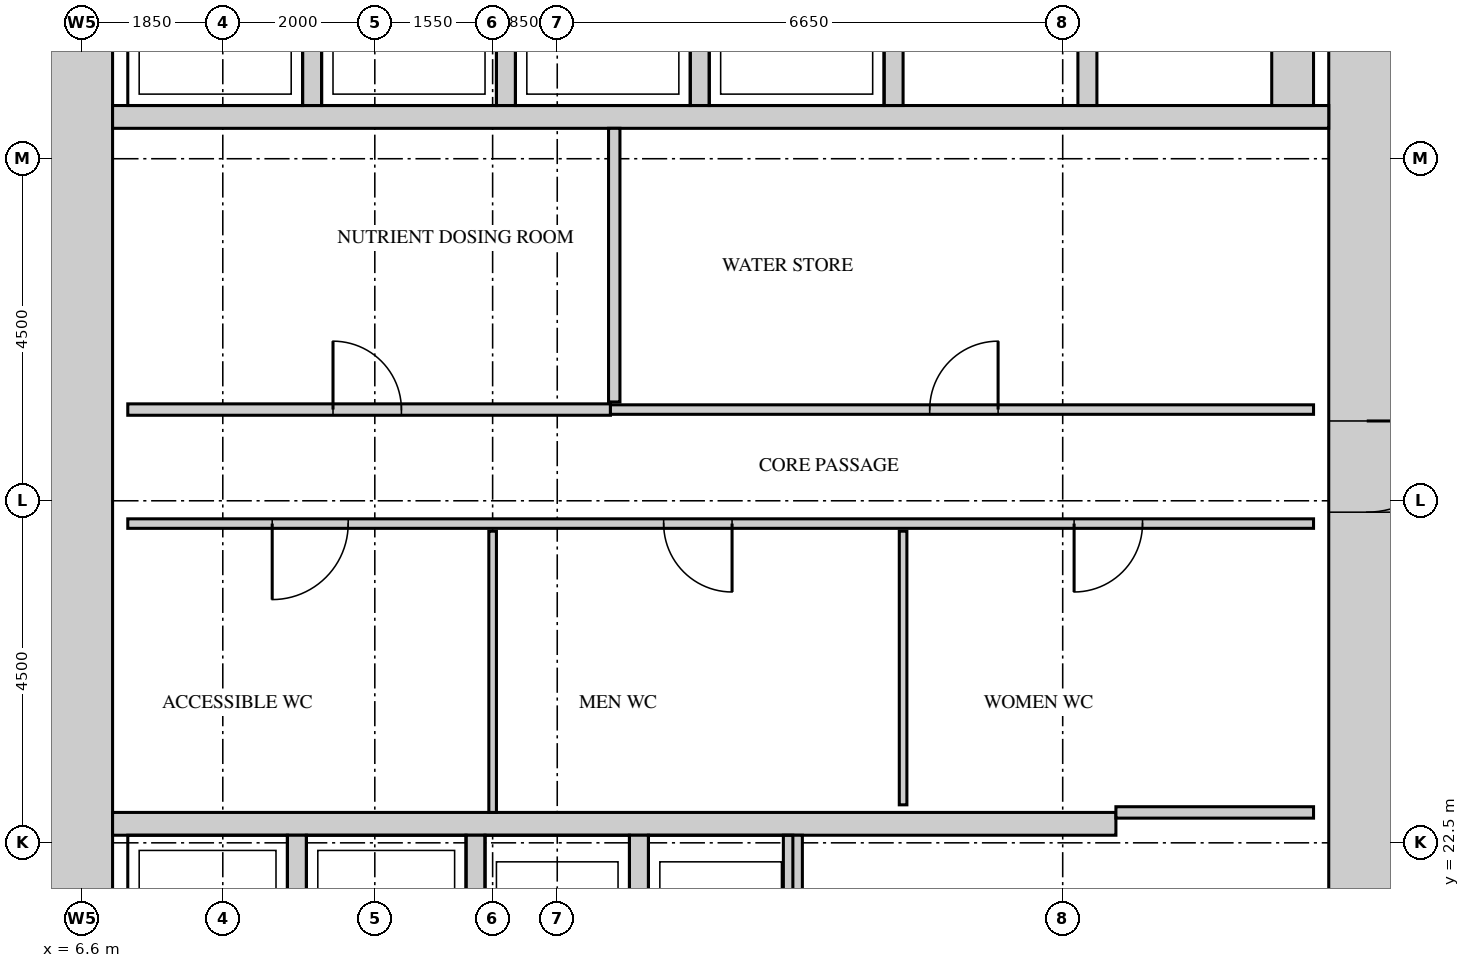
"""IFC4 building model, lengths in metres.
Left out: names, types, materials, properties, quantities, classifications, styles, units other than length and angle.
Written with IfcOpenShell. Run it as: python <this file> out.ifc"""

import sys

from ifc_helpers import new_model, si_unit, direction, frame, frame_2d, origin, place, context, subcontext, project, spatial, rectangle, extrude, source, transform, mapped, element, fill, save


model = new_model("IFC4")
c1 = context("Model", 3, precision=1e-05, world=origin(), true_north=direction((0.0, 1.0)))
c2 = subcontext(c1, "Body", "Model", "MODEL_VIEW")
j1 = project(units=[si_unit("LENGTHUNIT", "METRE"), si_unit("PLANEANGLEUNIT", "RADIAN")], contexts=[c1])
p1 = place(None, origin())
s1 = spatial("IfcSite", under=j1, at=p1, CompositionType="ELEMENT")
p2 = place(p1, origin())
s2 = spatial("IfcBuilding", under=s1, at=p2, CompositionType="ELEMENT")
p3 = place(p2, frame((0.0, 0.0, 101.5)))
s3 = spatial("IfcBuildingStorey", under=s2, at=p3, CompositionType="ELEMENT", Elevation=101.5)
m1 = source(origin(), c2, "Body", "SweptSolid", [
    extrude(rectangle(XDim=28.0, YDim=1.0, at=frame_2d((14.0, 0.0))), origin(), (0.0, 0.0, 1.0), 4.1),
])
p4 = place(p3, frame((23.5, 13.0, 0.0), z_axis=(0.0, 0.0, 1.0), x_axis=(0.0, 1.0, 0.0)))
e1 = element("IfcWall", 1, at=p4, inside=s3, PredefinedType="SHEAR", context=c2, shape_type="MappedRepresentation", body=[
    mapped(m1, transform((0.0, 0.0, 0.0))),
])
m2 = source(origin(), c2, "Body", "SweptSolid", [
    extrude(rectangle(XDim=1.8, YDim=2.1, at=frame_2d((0.9, 1.05))), frame((0.0, 0.51, 0.0), z_axis=(0.0, -1.0, 0.0), x_axis=(1.0, 0.0, 0.0)), (0.0, 0.0, 1.0), 1.02),
])
p5 = place(p4, frame((22.6, 0.0, 0.0)))
e2 = element("IfcOpeningElement", 2, at=p5, cuts=e1, PredefinedType="OPENING", context=c2, shape_type="MappedRepresentation", body=[
    mapped(m2, transform((0.0, 0.0, 0.0))),
])
m3 = source(origin(), c2, "Body", "SweptSolid", [
    extrude(rectangle(XDim=1.2, YDim=2.1, at=frame_2d((0.6, 1.05))), frame((0.0, 0.51, 0.0), z_axis=(0.0, -1.0, 0.0), x_axis=(1.0, 0.0, 0.0)), (0.0, 0.0, 1.0), 1.02),
])
p6 = place(p4, frame((13.85, 0.0, 0.0)))
e3 = element("IfcOpeningElement", 3, at=p6, cuts=e1, PredefinedType="OPENING", context=c2, shape_type="MappedRepresentation", body=[
    mapped(m3, transform((0.0, 0.0, 0.0))),
])
m4 = source(origin(), c2, "Body", "SweptSolid", [
    extrude(rectangle(XDim=0.9, YDim=2.1, at=frame_2d((0.45, 1.05))), frame((0.0, 0.51, 0.0), z_axis=(0.0, -1.0, 0.0), x_axis=(1.0, 0.0, 0.0)), (0.0, 0.0, 1.0), 1.02),
])
p7 = place(p4, frame((1.0, 0.0, 0.0)))
e4 = element("IfcOpeningElement", 4, at=p7, cuts=e1, PredefinedType="OPENING", context=c2, shape_type="MappedRepresentation", body=[
    mapped(m4, transform((0.0, 0.0, 0.0))),
])
p8 = place(p4, frame((4.0, 0.0, 0.0)))
e5 = element("IfcOpeningElement", 5, at=p8, cuts=e1, PredefinedType="OPENING", context=c2, shape_type="MappedRepresentation", body=[
    mapped(m4, transform((0.0, 0.0, 0.0))),
])
p9 = place(p4, frame((7.6, 0.0, 0.0)))
e6 = element("IfcOpeningElement", 6, at=p9, cuts=e1, PredefinedType="OPENING", context=c2, shape_type="MappedRepresentation", body=[
    mapped(m4, transform((0.0, 0.0, 0.0))),
])
p10 = place(p3, frame((6.5, 13.0, 0.0), z_axis=(0.0, 0.0, 1.0), x_axis=(0.0, 1.0, 0.0)))
e7 = element("IfcWall", 7, at=p10, inside=s3, PredefinedType="SHEAR", context=c2, shape_type="MappedRepresentation", body=[
    mapped(m1, transform((0.0, 0.0, 0.0))),
])
m5 = source(origin(), c2, "Body", "SweptSolid", [
    extrude(rectangle(XDim=13.2, YDim=0.3, at=frame_2d((6.6, 0.0))), origin(), (0.0, 0.0, 1.0), 4.1),
])
p11 = place(p3, frame((7.0, 22.75, 0.0), z_axis=(0.0, 0.0, 1.0), x_axis=(1.0, 0.0, 0.0)))
e8 = element("IfcWall", 8, at=p11, inside=s3, PredefinedType="STANDARD", context=c2, shape_type="MappedRepresentation", body=[
    mapped(m5, transform((0.0, 0.0, 0.0))),
])
m6 = source(origin(), c2, "Body", "SweptSolid", [
    extrude(rectangle(XDim=16.0, YDim=0.3, at=frame_2d((8.0, 0.0))), origin(), (0.0, 0.0, 1.0), 4.1),
])
p12 = place(p3, frame((7.0, 32.05, 0.0), z_axis=(0.0, 0.0, 1.0), x_axis=(1.0, 0.0, 0.0)))
e9 = element("IfcWall", 9, at=p12, inside=s3, PredefinedType="STANDARD", context=c2, shape_type="MappedRepresentation", body=[
    mapped(m6, transform((0.0, 0.0, 0.0))),
])
m7 = source(origin(), c2, "Body", "SweptSolid", [
    extrude(rectangle(XDim=3.1, YDim=0.25, at=frame_2d((1.55, 0.0))), origin(), (0.0, 0.0, 1.0), 4.1),
])
for number, where, z_axis, x_axis in (
    (10, (9.425, 19.5, 0.0), (0.0, 0.0, 1.0), (0.0, 1.0, 0.0)),
    (11, (11.775, 19.5, 0.0), (0.0, 0.0, 1.0), (0.0, 1.0, 0.0)),
    (12, (13.925, 19.5, 0.0), (0.0, 0.0, 1.0), (0.0, 1.0, 0.0)),
    (13, (15.95, 19.5, 0.0), (0.0, 0.0, 1.0), (0.0, 1.0, 0.0)),
):
    element("IfcWall", number, at=place(p3, frame(where, z_axis=z_axis, x_axis=x_axis)), inside=s3, PredefinedType="STANDARD", context=c2, shape_type="MappedRepresentation", body=[
        mapped(m7, transform((0.0, 0.0, 0.0))),
    ])
m8 = source(origin(), c2, "Body", "SweptSolid", [
    extrude(rectangle(XDim=2.4, YDim=0.25, at=frame_2d((1.2, 0.0))), origin(), (0.0, 0.0, 1.0), 4.1),
])
for number, where, z_axis, x_axis in (
    (14, (9.625, 32.2, 0.0), (0.0, 0.0, 1.0), (0.0, 1.0, 0.0)),
    (15, (12.175, 32.2, 0.0), (0.0, 0.0, 1.0), (0.0, 1.0, 0.0)),
    (16, (14.725, 32.2, 0.0), (0.0, 0.0, 1.0), (0.0, 1.0, 0.0)),
    (17, (17.275, 32.2, 0.0), (0.0, 0.0, 1.0), (0.0, 1.0, 0.0)),
    (18, (19.825, 32.2, 0.0), (0.0, 0.0, 1.0), (0.0, 1.0, 0.0)),
):
    element("IfcWall", number, at=place(p3, frame(where, z_axis=z_axis, x_axis=x_axis)), inside=s3, PredefinedType="STANDARD", context=c2, shape_type="MappedRepresentation", body=[
        mapped(m8, transform((0.0, 0.0, 0.0))),
    ])
m9 = source(origin(), c2, "Body", "SweptSolid", [
    extrude(rectangle(XDim=2.4, YDim=0.55, at=frame_2d((1.2, 0.0))), origin(), (0.0, 0.0, 1.0), 4.1),
])
p13 = place(p3, frame((22.525, 32.2, 0.0), z_axis=(0.0, 0.0, 1.0), x_axis=(0.0, 1.0, 0.0)))
e19 = element("IfcWall", 19, at=p13, inside=s3, PredefinedType="STANDARD", context=c2, shape_type="MappedRepresentation", body=[
    mapped(m9, transform((0.0, 0.0, 0.0))),
])
m10 = source(origin(), c2, "Body", "SweptSolid", [
    extrude(rectangle(XDim=3.7, YDim=0.1, at=frame_2d((1.85, 0.0))), origin(), (0.0, 0.0, 1.0), 4.2),
])
p14 = place(p3, frame((12.0, 22.9, 0.0), z_axis=(0.0, 0.0, 1.0), x_axis=(0.0, 1.0, 0.0)))
e20 = element("IfcWall", 20, at=p14, inside=s3, PredefinedType="PARTITIONING", context=c2, shape_type="MappedRepresentation", body=[
    mapped(m10, transform((0.0, 0.0, 0.0))),
])
m11 = source(origin(), c2, "Body", "SweptSolid", [
    extrude(rectangle(XDim=2.6, YDim=0.15, at=frame_2d((1.3, 0.0))), origin(), (0.0, 0.0, 1.0), 4.2),
])
p15 = place(p3, frame((20.2, 22.9, 0.0), z_axis=(0.0, 0.0, 1.0), x_axis=(1.0, 0.0, 0.0)))
e21 = element("IfcWall", 21, at=p15, inside=s3, PredefinedType="PARTITIONING", context=c2, shape_type="MappedRepresentation", body=[
    mapped(m11, transform((0.0, 0.0, 0.0))),
])
m12 = source(origin(), c2, "Body", "SweptSolid", [
    extrude(rectangle(XDim=3.6, YDim=0.1, at=frame_2d((1.8, 0.0))), origin(), (0.0, 0.0, 1.0), 4.2),
])
p16 = place(p3, frame((17.4, 23.0, 0.0), z_axis=(0.0, 0.0, 1.0), x_axis=(0.0, 1.0, 0.0)))
e22 = element("IfcWall", 22, at=p16, inside=s3, PredefinedType="PARTITIONING", context=c2, shape_type="MappedRepresentation", body=[
    mapped(m12, transform((0.0, 0.0, 0.0))),
])
m13 = source(origin(), c2, "Body", "SweptSolid", [
    extrude(rectangle(XDim=15.6, YDim=0.125, at=frame_2d((7.8, 0.0))), origin(), (0.0, 0.0, 1.0), 4.2),
])
p17 = place(p3, frame((7.2, 26.7, 0.0), z_axis=(0.0, 0.0, 1.0), x_axis=(1.0, 0.0, 0.0)))
e23 = element("IfcWall", 23, at=p17, inside=s3, PredefinedType="PARTITIONING", context=c2, shape_type="MappedRepresentation", body=[
    mapped(m13, transform((0.0, 0.0, 0.0))),
])
m14 = source(origin(), c2, "Body", "SweptSolid", [
    extrude(rectangle(XDim=1.0, YDim=2.1, at=frame_2d((0.5, 1.05))), frame((0.0, 0.073, 0.0), z_axis=(0.0, -1.0, 0.0), x_axis=(1.0, 0.0, 0.0)), (0.0, 0.0, 1.0), 0.145),
])
p18 = place(p17, frame((1.9, 0.0, 0.0)))
e24 = element("IfcOpeningElement", 24, at=p18, cuts=e23, PredefinedType="OPENING", context=c2, shape_type="MappedRepresentation", body=[
    mapped(m14, transform((0.0, 0.0, 0.0))),
])
m15 = source(origin(), c2, "Body", "SweptSolid", [
    extrude(rectangle(XDim=0.9, YDim=2.1, at=frame_2d((0.45, 1.05))), frame((0.0, 0.073, 0.0), z_axis=(0.0, -1.0, 0.0), x_axis=(1.0, 0.0, 0.0)), (0.0, 0.0, 1.0), 0.145),
])
p19 = place(p17, frame((7.05, 0.0, 0.0)))
e25 = element("IfcOpeningElement", 25, at=p19, cuts=e23, PredefinedType="OPENING", context=c2, shape_type="MappedRepresentation", body=[
    mapped(m15, transform((0.0, 0.0, 0.0))),
])
p20 = place(p17, frame((12.45, 0.0, 0.0)))
e26 = element("IfcOpeningElement", 26, at=p20, cuts=e23, PredefinedType="OPENING", context=c2, shape_type="MappedRepresentation", body=[
    mapped(m15, transform((0.0, 0.0, 0.0))),
])
m16 = source(origin(), c2, "Body", "SweptSolid", [
    extrude(rectangle(XDim=6.35, YDim=0.15, at=frame_2d((3.175, 0.0))), origin(), (0.0, 0.0, 1.0), 4.2),
])
p21 = place(p3, frame((7.2, 28.2, 0.0), z_axis=(0.0, 0.0, 1.0), x_axis=(1.0, 0.0, 0.0)))
e27 = element("IfcWall", 27, at=p21, inside=s3, PredefinedType="PARTITIONING", context=c2, shape_type="MappedRepresentation", body=[
    mapped(m16, transform((0.0, 0.0, 0.0))),
])
m17 = source(origin(), c2, "Body", "SweptSolid", [
    extrude(rectangle(XDim=0.9, YDim=2.1, at=frame_2d((0.45, 1.05))), frame((0.0, 0.085, 0.0), z_axis=(0.0, -1.0, 0.0), x_axis=(1.0, 0.0, 0.0)), (0.0, 0.0, 1.0), 0.17),
])
p22 = place(p21, frame((2.7, 0.0, 0.0)))
e28 = element("IfcOpeningElement", 28, at=p22, cuts=e27, PredefinedType="OPENING", context=c2, shape_type="MappedRepresentation", body=[
    mapped(m17, transform((0.0, 0.0, 0.0))),
])
m18 = source(origin(), c2, "Body", "SweptSolid", [
    extrude(rectangle(XDim=9.25, YDim=0.125, at=frame_2d((4.625, 0.0))), origin(), (0.0, 0.0, 1.0), 4.2),
])
p23 = place(p3, frame((13.55, 28.2, 0.0), z_axis=(0.0, 0.0, 1.0), x_axis=(1.0, 0.0, 0.0)))
e29 = element("IfcWall", 29, at=p23, inside=s3, PredefinedType="PARTITIONING", context=c2, shape_type="MappedRepresentation", body=[
    mapped(m18, transform((0.0, 0.0, 0.0))),
])
p24 = place(p23, frame((4.2, 0.0, 0.0)))
e30 = element("IfcOpeningElement", 30, at=p24, cuts=e29, PredefinedType="OPENING", context=c2, shape_type="MappedRepresentation", body=[
    mapped(m15, transform((0.0, 0.0, 0.0))),
])
m19 = source(origin(), c2, "Body", "SweptSolid", [
    extrude(rectangle(XDim=3.6, YDim=0.15, at=frame_2d((1.8, 0.0))), origin(), (0.0, 0.0, 1.0), 4.2),
])
p25 = place(p3, frame((13.6, 28.3, 0.0), z_axis=(0.0, 0.0, 1.0), x_axis=(0.0, 1.0, 0.0)))
e31 = element("IfcWall", 31, at=p25, inside=s3, PredefinedType="PARTITIONING", context=c2, shape_type="MappedRepresentation", body=[
    mapped(m19, transform((0.0, 0.0, 0.0))),
])
m20 = source(origin(), c2, "Body", "SweptSolid", [
    extrude(rectangle(XDim=1.2, YDim=2.1, at=frame_2d((0.6, 1.05))), frame((0.0, 0.45, 0.0), z_axis=(0.0, -1.0, 0.0), x_axis=(1.0, 0.0, 0.0)), (0.0, 0.0, 1.0), 0.9),
])
p26 = place(p6, origin())
e32 = element("IfcDoor", 32, at=p26, inside=s3, OperationType="SINGLE_SWING_RIGHT", PredefinedType="DOOR", context=c2, shape_type="MappedRepresentation", body=[
    mapped(m20, transform((0.0, 0.0, 0.0))),
])
fill(e3, e32)
m21 = source(origin(), c2, "Body", "SweptSolid", [
    extrude(rectangle(XDim=0.9, YDim=2.1, at=frame_2d((0.45, 1.05))), frame((0.0, 0.025, 0.0), z_axis=(0.0, -1.0, 0.0), x_axis=(1.0, 0.0, 0.0)), (0.0, 0.0, 1.0), 0.05),
])
p27 = place(p22, origin())
e33 = element("IfcDoor", 33, at=p27, inside=s3, OperationType="SINGLE_SWING_RIGHT", PredefinedType="DOOR", context=c2, shape_type="MappedRepresentation", body=[
    mapped(m21, transform((0.0, 0.0, 0.0))),
])
fill(e28, e33)
p28 = place(p24, origin())
e34 = element("IfcDoor", 34, at=p28, inside=s3, OperationType="SINGLE_SWING_LEFT", PredefinedType="DOOR", context=c2, shape_type="MappedRepresentation", body=[
    mapped(m21, transform((0.0, 0.0, 0.0))),
])
fill(e30, e34)
m22 = source(origin(), c2, "Body", "SweptSolid", [
    extrude(rectangle(XDim=1.0, YDim=2.1, at=frame_2d((0.5, 1.05))), frame((0.0, 0.025, 0.0), z_axis=(0.0, -1.0, 0.0), x_axis=(1.0, 0.0, 0.0)), (0.0, 0.0, 1.0), 0.05),
])
p29 = place(p18, origin())
e35 = element("IfcDoor", 35, at=p29, inside=s3, OperationType="SINGLE_SWING_LEFT", PredefinedType="DOOR", context=c2, shape_type="MappedRepresentation", body=[
    mapped(m22, transform((0.0, 0.0, 0.0))),
])
fill(e24, e35)
p30 = place(p19, origin())
e36 = element("IfcDoor", 36, at=p30, inside=s3, OperationType="SINGLE_SWING_RIGHT", PredefinedType="DOOR", context=c2, shape_type="MappedRepresentation", body=[
    mapped(m21, transform((0.0, 0.0, 0.0))),
])
fill(e25, e36)
p31 = place(p20, origin())
e37 = element("IfcDoor", 37, at=p31, inside=s3, OperationType="SINGLE_SWING_LEFT", PredefinedType="DOOR", context=c2, shape_type="MappedRepresentation", body=[
    mapped(m21, transform((0.0, 0.0, 0.0))),
])
fill(e26, e37)
save(model, sys.argv[1])
